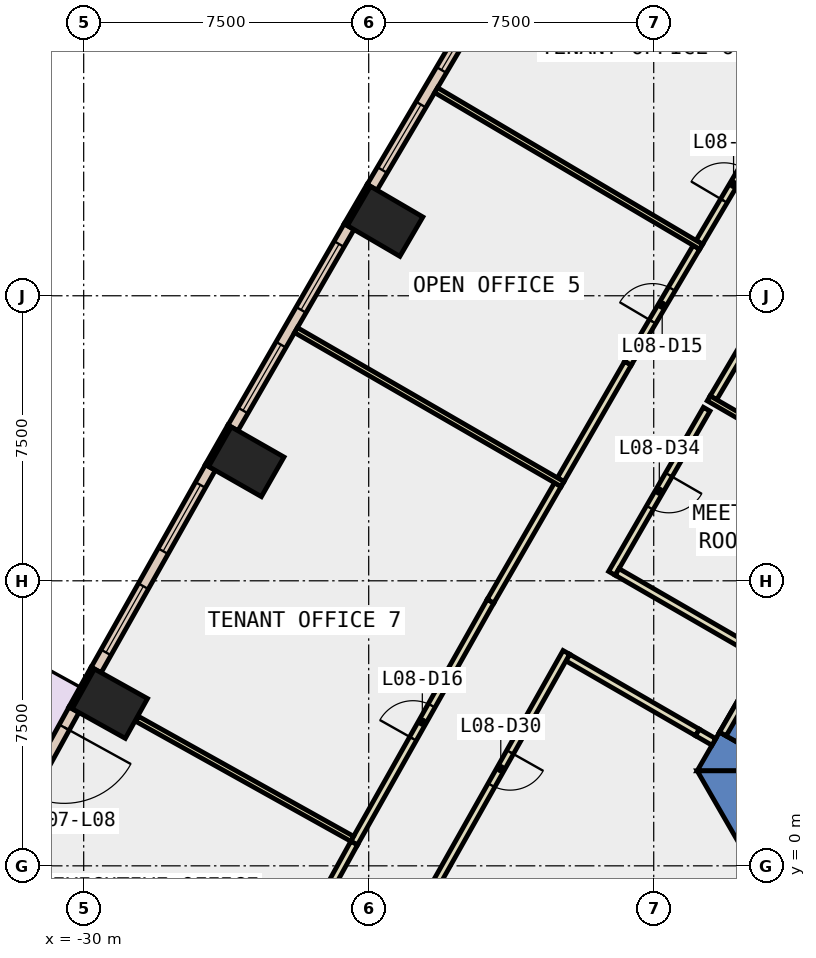
"""IFC4 building model, lengths in metres.
Left out: names, types, materials, properties, quantities, classifications, styles, units other than length and angle.
Written with IfcOpenShell. Run it as: python <this file> out.ifc"""

import sys

from ifc_helpers import new_model, si_unit, direction, frame, frame_2d, origin, origin_2d, place, context, subcontext, project, spatial, polyline, rectangle, outline, extrude, element, fill, save


model = new_model("IFC4")
c1 = context("Model", 3, precision=1e-05, world=origin(), true_north=direction((0.0, 1.0)))
c2 = subcontext(c1, "Body", "Model", "MODEL_VIEW")
j1 = project(units=[si_unit("LENGTHUNIT", "METRE"), si_unit("PLANEANGLEUNIT", "RADIAN")], contexts=[c1])
p1 = place(None, origin())
s1 = spatial("IfcSite", under=j1, at=p1, CompositionType="ELEMENT")
p2 = place(p1, origin())
s2 = spatial("IfcBuilding", under=s1, at=p2, CompositionType="ELEMENT")
p3 = place(p2, frame((0.0, 0.0, 43.4)))
s3 = spatial("IfcBuildingStorey", under=s2, at=p3, CompositionType="ELEMENT", Elevation=43.4)
for number, where, z_axis, x_axis in (
    (1, (-22.068, 16.959, -0.4), (0.0, 0.0, 1.0), (0.504, 0.864, 0.0)),
    (2, (-25.721, 10.632, -0.4), (0.0, 0.0, 1.0), (0.496, 0.869, 0.0)),
    (3, (-29.311, 4.267, -0.4), (0.0, 0.0, 1.0), (0.487, 0.873, 0.0)),
):
    element("IfcColumn", number, at=place(p3, frame(where, z_axis=z_axis, x_axis=x_axis)), inside=s3, PredefinedType="COLUMN", context=c2, shape_type="SweptSolid", body=[
        extrude(rectangle(XDim=1.2, YDim=1.6, at=origin_2d()), origin(), (0.0, 0.0, 1.0), 4.2),
    ])
p4 = place(p3, frame((0.0, 0.0, -0.4)))
e4 = element("IfcWall", 4, at=p4, inside=s3, PredefinedType="SHEAR", context=c2, shape_type="SweptSolid", body=[
    extrude(outline(polyline([(-12.402, 3.02), (-13.267, 3.52), (-13.856, 2.5), (-12.702, 2.5), (-12.402, 3.02)])), origin(), (0.0, 0.0, 1.0), 4.2),
])
p5 = place(p3, frame((0.0, 0.0, 3.6)))
e5 = element("IfcWall", 5, at=p5, inside=s3, PredefinedType="SHEAR", context=c2, shape_type="SweptSolid", body=[
    extrude(outline(polyline([(-13.267, 3.52), (-12.402, 3.02), (-11.402, 4.752), (-12.267, 5.252), (-13.267, 3.52)])), origin(), (0.0, 0.0, 1.0), 0.2),
])
p6 = place(p3, frame((0.0, 0.0, -0.4)))
e6 = element("IfcWall", 6, at=p6, inside=s3, PredefinedType="SHEAR", context=c2, shape_type="SweptSolid", body=[
    extrude(outline(polyline([(-13.856, 2.5), (-6.928, -9.5), (-6.351, -8.5), (-12.702, 2.5), (-13.856, 2.5)])), origin(), (0.0, 0.0, 1.0), 4.2),
])
p7 = place(p3, frame((-22.499, 17.906, 0.0), z_axis=(0.0, 0.0, 1.0), x_axis=(-0.504313844903, -0.863520437418, 0.0)))
e7 = element("IfcWall", 7, at=p7, inside=s3, PredefinedType="STANDARD", context=c2, shape_type="SweptSolid", body=[
    extrude(rectangle(XDim=1.2, YDim=0.1, at=frame_2d((0.6, 0.0))), origin(), (0.0, 0.0, 1.0), 3.8),
])
p8 = place(p3, frame((-26.162, 11.574, 0.0), z_axis=(0.0, 0.0, 1.0), x_axis=(-0.495854054996, -0.868405870629, 0.0)))
e8 = element("IfcWall", 8, at=p8, inside=s3, PredefinedType="STANDARD", context=c2, shape_type="SweptSolid", body=[
    extrude(rectangle(XDim=1.2, YDim=0.1, at=frame_2d((0.6, 0.0))), origin(), (0.0, 0.0, 1.0), 3.8),
])
p9 = place(p3, frame((-29.761, 5.205, 0.0), z_axis=(0.0, 0.0, 1.0), x_axis=(-0.486730996044, -0.87355190887, 0.0)))
e9 = element("IfcWall", 9, at=p9, inside=s3, PredefinedType="STANDARD", context=c2, shape_type="SweptSolid", body=[
    extrude(rectangle(XDim=1.2, YDim=0.1, at=frame_2d((0.6, 0.0))), origin(), (0.0, 0.0, 1.0), 3.8),
])
p10 = place(p3, frame((-19.299, 23.119, 0.0), z_axis=(0.0, 0.0, 1.0), x_axis=(-0.508749483145, -0.860914608658, 0.0)))
e10 = element("IfcWall", 10, at=p10, inside=s3, PredefinedType="STANDARD", context=c2, shape_type="SweptSolid", body=[
    extrude(rectangle(XDim=6.117, YDim=0.3, at=frame_2d((3.058, 0.0))), origin(), (0.0, 0.0, 1.0), 3.8),
])
p11 = place(p10, frame((0.529, 0.0, 0.9)))
e11 = element("IfcOpeningElement", 11, at=p11, cuts=e10, PredefinedType="OPENING", context=c2, shape_type="SweptSolid", body=[
    extrude(rectangle(XDim=2.0, YDim=2.6, at=frame_2d((1.0, 1.3))), frame((0.0, 0.16, 0.0), z_axis=(0.0, -1.0, 0.0), x_axis=(1.0, 0.0, 0.0)), (0.0, 0.0, 1.0), 0.32),
])
p12 = place(p10, frame((3.588, 0.0, 0.9)))
e12 = element("IfcOpeningElement", 12, at=p12, cuts=e10, PredefinedType="OPENING", context=c2, shape_type="SweptSolid", body=[
    extrude(rectangle(XDim=2.0, YDim=2.6, at=frame_2d((1.0, 1.3))), frame((0.0, 0.16, 0.0), z_axis=(0.0, -1.0, 0.0), x_axis=(1.0, 0.0, 0.0)), (0.0, 0.0, 1.0), 0.32),
])
p13 = place(p3, frame((-23.015, 16.819, 0.0), z_axis=(0.0, 0.0, 1.0), x_axis=(-0.499976985038, -0.866038691071, 0.0)))
e13 = element("IfcWall", 13, at=p13, inside=s3, PredefinedType="STANDARD", context=c2, shape_type="SweptSolid", body=[
    extrude(rectangle(XDim=6.116, YDim=0.3, at=frame_2d((3.058, 0.0))), origin(), (0.0, 0.0, 1.0), 3.8),
])
p14 = place(p13, frame((0.529, 0.0, 0.9)))
e14 = element("IfcOpeningElement", 14, at=p14, cuts=e13, PredefinedType="OPENING", context=c2, shape_type="SweptSolid", body=[
    extrude(rectangle(XDim=2.0, YDim=2.6, at=frame_2d((1.0, 1.3))), frame((0.0, 0.16, 0.0), z_axis=(0.0, -1.0, 0.0), x_axis=(1.0, 0.0, 0.0)), (0.0, 0.0, 1.0), 0.32),
])
p15 = place(p13, frame((3.587, 0.0, 0.9)))
e15 = element("IfcOpeningElement", 15, at=p15, cuts=e13, PredefinedType="OPENING", context=c2, shape_type="SweptSolid", body=[
    extrude(rectangle(XDim=2.0, YDim=2.6, at=frame_2d((1.0, 1.3))), frame((0.0, 0.16, 0.0), z_axis=(0.0, -1.0, 0.0), x_axis=(1.0, 0.0, 0.0)), (0.0, 0.0, 1.0), 0.32),
])
p16 = place(p3, frame((-26.667, 10.482, 0.0), z_axis=(0.0, 0.0, 1.0), x_axis=(-0.491278487323, -0.871002553322, 0.0)))
e16 = element("IfcWall", 16, at=p16, inside=s3, PredefinedType="STANDARD", context=c2, shape_type="SweptSolid", body=[
    extrude(rectangle(XDim=6.117, YDim=0.3, at=frame_2d((3.059, 0.0))), origin(), (0.0, 0.0, 1.0), 3.8),
])
p17 = place(p16, frame((0.529, 0.0, 0.9)))
e17 = element("IfcOpeningElement", 17, at=p17, cuts=e16, PredefinedType="OPENING", context=c2, shape_type="SweptSolid", body=[
    extrude(rectangle(XDim=2.0, YDim=2.6, at=frame_2d((1.0, 1.3))), frame((0.0, 0.16, 0.0), z_axis=(0.0, -1.0, 0.0), x_axis=(1.0, 0.0, 0.0)), (0.0, 0.0, 1.0), 0.32),
])
p18 = place(p16, frame((3.588, 0.0, 0.9)))
e18 = element("IfcOpeningElement", 18, at=p18, cuts=e16, PredefinedType="OPENING", context=c2, shape_type="SweptSolid", body=[
    extrude(rectangle(XDim=2.0, YDim=2.6, at=frame_2d((1.0, 1.3))), frame((0.0, 0.16, 0.0), z_axis=(0.0, -1.0, 0.0), x_axis=(1.0, 0.0, 0.0)), (0.0, 0.0, 1.0), 0.32),
])
p19 = place(p3, frame((-30.255, 4.107, 0.0), z_axis=(0.0, 0.0, 1.0), x_axis=(-0.482596003603, -0.875843078015, 0.0)))
e19 = element("IfcWall", 19, at=p19, inside=s3, PredefinedType="STANDARD", context=c2, shape_type="SweptSolid", body=[
    extrude(rectangle(XDim=6.115, YDim=0.3, at=frame_2d((3.058, 0.0))), origin(), (0.0, 0.0, 1.0), 3.8),
])
p20 = place(p19, frame((0.529, 0.0, 0.0)))
e20 = element("IfcOpeningElement", 20, at=p20, cuts=e19, PredefinedType="OPENING", context=c2, shape_type="SweptSolid", body=[
    extrude(rectangle(XDim=2.0, YDim=2.4, at=frame_2d((1.0, 1.2))), frame((0.0, 0.16, 0.0), z_axis=(0.0, -1.0, 0.0), x_axis=(1.0, 0.0, 0.0)), (0.0, 0.0, 1.0), 0.32),
])
p21 = place(p19, frame((3.586, 0.0, 0.9)))
e21 = element("IfcOpeningElement", 21, at=p21, cuts=e19, PredefinedType="OPENING", context=c2, shape_type="SweptSolid", body=[
    extrude(rectangle(XDim=2.0, YDim=2.6, at=frame_2d((1.0, 1.3))), frame((0.0, 0.16, 0.0), z_axis=(0.0, -1.0, 0.0), x_axis=(1.0, 0.0, 0.0)), (0.0, 0.0, 1.0), 0.32),
])
p22 = place(p3, frame((-13.606, 12.016, 0.0), z_axis=(0.0, 0.0, 1.0), x_axis=(-0.499992180995, -0.866029918042, 0.0)))
e22 = element("IfcWall", 22, at=p22, inside=s3, PredefinedType="PARTITIONING", context=c2, shape_type="SweptSolid", body=[
    extrude(rectangle(XDim=4.988, YDim=0.2, at=frame_2d((2.494, 0.0))), origin(), (0.0, 0.0, 1.0), 3.8),
])
p23 = place(p22, frame((1.994, 0.0, 0.0)))
e23 = element("IfcOpeningElement", 23, at=p23, cuts=e22, PredefinedType="OPENING", context=c2, shape_type="SweptSolid", body=[
    extrude(rectangle(XDim=1.0, YDim=2.1, at=frame_2d((0.5, 1.05))), frame((0.0, 0.11, 0.0), z_axis=(0.0, -1.0, 0.0), x_axis=(1.0, 0.0, 0.0)), (0.0, 0.0, 1.0), 0.22),
])
p24 = place(p3, frame((-15.963, 7.733, 0.0), z_axis=(0.0, 0.0, 1.0), x_axis=(0.865965832374, -0.500103166518, 0.0)))
e24 = element("IfcWall", 24, at=p24, inside=s3, PredefinedType="PARTITIONING", context=c2, shape_type="SweptSolid", body=[
    extrude(rectangle(XDim=3.941, YDim=0.2, at=frame_2d((1.971, 0.0))), origin(), (0.0, 0.0, 1.0), 3.8),
])
p25 = place(p3, frame((-12.218, 14.364, 0.0), z_axis=(0.0, 0.0, 1.0), x_axis=(-0.508767325294, -0.860904064756, 0.0)))
e25 = element("IfcWall", 25, at=p25, inside=s3, PredefinedType="PARTITIONING", context=c2, shape_type="SweptSolid", body=[
    extrude(rectangle(XDim=2.38, YDim=0.2, at=frame_2d((1.19, 0.0))), origin(), (0.0, 0.0, 1.0), 3.8),
])
p26 = place(p3, frame((-17.261, 5.48, 0.0), z_axis=(0.0, 0.0, 1.0), x_axis=(0.865949187497, -0.500131987253, 0.0)))
e26 = element("IfcWall", 26, at=p26, inside=s3, PredefinedType="PARTITIONING", context=c2, shape_type="SweptSolid", body=[
    extrude(rectangle(XDim=3.939, YDim=0.2, at=frame_2d((1.969, 0.0))), origin(), (0.0, 0.0, 1.0), 3.8),
])
p27 = place(p3, frame((-17.299, 5.617, 0.0), z_axis=(0.0, 0.0, 1.0), x_axis=(-0.491166441632, -0.871065741844, 0.0)))
e27 = element("IfcWall", 27, at=p27, inside=s3, PredefinedType="PARTITIONING", context=c2, shape_type="SweptSolid", body=[
    extrude(rectangle(XDim=7.028, YDim=0.2, at=frame_2d((3.514, 0.0))), origin(), (0.0, 0.0, 1.0), 3.8),
])
p28 = place(p27, frame((3.014, 0.0, 0.0)))
e28 = element("IfcOpeningElement", 28, at=p28, cuts=e27, PredefinedType="OPENING", context=c2, shape_type="SweptSolid", body=[
    extrude(rectangle(XDim=1.0, YDim=2.1, at=frame_2d((0.5, 1.05))), frame((0.0, 0.11, 0.0), z_axis=(0.0, -1.0, 0.0), x_axis=(1.0, 0.0, 0.0)), (0.0, 0.0, 1.0), 0.22),
])
p29 = place(p3, frame((-13.8, 16.404, 0.0), z_axis=(0.0, 0.0, 1.0), x_axis=(0.508666621784, 0.860963569428, 0.0)))
e29 = element("IfcWall", 29, at=p29, inside=s3, PredefinedType="PARTITIONING", context=c2, shape_type="SweptSolid", body=[
    extrude(rectangle(XDim=3.542, YDim=0.2, at=frame_2d((1.771, 0.0))), origin(), (0.0, 0.0, 1.0), 3.8),
])
p30 = place(p29, frame((1.271, 0.0, 0.0)))
e30 = element("IfcOpeningElement", 30, at=p30, cuts=e29, PredefinedType="OPENING", context=c2, shape_type="SweptSolid", body=[
    extrude(rectangle(XDim=1.0, YDim=2.1, at=frame_2d((0.5, 1.05))), frame((0.0, 0.11, 0.0), z_axis=(0.0, -1.0, 0.0), x_axis=(1.0, 0.0, 0.0)), (0.0, 0.0, 1.0), 0.22),
])
p31 = place(p3, frame((-17.448, 10.16, 0.0), z_axis=(0.0, 0.0, 1.0), x_axis=(0.499951278228, 0.866053531485, 0.0)))
e31 = element("IfcWall", 31, at=p31, inside=s3, PredefinedType="PARTITIONING", context=c2, shape_type="SweptSolid", body=[
    extrude(rectangle(XDim=3.54, YDim=0.2, at=frame_2d((1.77, 0.0))), origin(), (0.0, 0.0, 1.0), 3.8),
])
p32 = place(p3, frame((-15.678, 13.226, 0.0), z_axis=(0.0, 0.0, 1.0), x_axis=(0.508613166028, 0.860995149431, 0.0)))
e32 = element("IfcWall", 32, at=p32, inside=s3, PredefinedType="PARTITIONING", context=c2, shape_type="SweptSolid", body=[
    extrude(rectangle(XDim=3.541, YDim=0.2, at=frame_2d((1.771, 0.0))), origin(), (0.0, 0.0, 1.0), 3.8),
])
p33 = place(p32, frame((1.271, 0.0, 0.0)))
e33 = element("IfcOpeningElement", 33, at=p33, cuts=e32, PredefinedType="OPENING", context=c2, shape_type="SweptSolid", body=[
    extrude(rectangle(XDim=1.0, YDim=2.1, at=frame_2d((0.5, 1.05))), frame((0.0, 0.11, 0.0), z_axis=(0.0, -1.0, 0.0), x_axis=(1.0, 0.0, 0.0)), (0.0, 0.0, 1.0), 0.22),
])
p34 = place(p3, frame((-22.884, 0.598, 0.0), z_axis=(0.0, 0.0, 1.0), x_axis=(0.491206176175, 0.871043335597, 0.0)))
e34 = element("IfcWall", 34, at=p34, inside=s3, PredefinedType="PARTITIONING", context=c2, shape_type="SweptSolid", body=[
    extrude(rectangle(XDim=7.309, YDim=0.2, at=frame_2d((3.654, 0.0))), origin(), (0.0, 0.0, 1.0), 3.8),
])
p35 = place(p34, frame((3.154, 0.0, 0.0)))
e35 = element("IfcOpeningElement", 35, at=p35, cuts=e34, PredefinedType="OPENING", context=c2, shape_type="SweptSolid", body=[
    extrude(rectangle(XDim=1.0, YDim=2.1, at=frame_2d((0.5, 1.05))), frame((0.0, 0.11, 0.0), z_axis=(0.0, -1.0, 0.0), x_axis=(1.0, 0.0, 0.0)), (0.0, 0.0, 1.0), 0.22),
])
p36 = place(p3, frame((-19.294, 6.964, 0.0), z_axis=(0.0, 0.0, 1.0), x_axis=(0.499861717316, 0.86610522661, 0.0)))
e36 = element("IfcWall", 36, at=p36, inside=s3, PredefinedType="PARTITIONING", context=c2, shape_type="SweptSolid", body=[
    extrude(rectangle(XDim=3.541, YDim=0.2, at=frame_2d((1.771, 0.0))), origin(), (0.0, 0.0, 1.0), 3.8),
])
p37 = place(p3, frame((-26.373, -5.736, 0.0), z_axis=(0.0, 0.0, 1.0), x_axis=(0.482587313112, 0.875847866483, 0.0)))
e37 = element("IfcWall", 37, at=p37, inside=s3, PredefinedType="PARTITIONING", context=c2, shape_type="SweptSolid", body=[
    extrude(rectangle(XDim=7.232, YDim=0.2, at=frame_2d((3.616, 0.0))), origin(), (0.0, 0.0, 1.0), 3.8),
])
p38 = place(p37, frame((3.191, 0.0, 0.0)))
e38 = element("IfcOpeningElement", 38, at=p38, cuts=e37, PredefinedType="OPENING", context=c2, shape_type="SweptSolid", body=[
    extrude(rectangle(XDim=1.0, YDim=2.1, at=frame_2d((0.5, 1.05))), frame((0.0, 0.11, 0.0), z_axis=(0.0, -1.0, 0.0), x_axis=(1.0, 0.0, 0.0)), (0.0, 0.0, 1.0), 0.22),
])
p39 = place(p3, frame((-13.554, 12.3, 0.0), z_axis=(0.0, 0.0, 1.0), x_axis=(0.866028685375, -0.499994316075, 0.0)))
e39 = element("IfcWall", 39, at=p39, inside=s3, PredefinedType="PARTITIONING", context=c2, shape_type="SweptSolid", body=[
    extrude(rectangle(XDim=4.638, YDim=0.15, at=frame_2d((2.319, 0.0))), origin(), (0.0, 0.0, 1.0), 3.8),
])
p40 = place(p3, frame((-13.752, 16.289, 0.0), z_axis=(0.0, 0.0, 1.0), x_axis=(-0.86093852802, 0.508709004216, 0.0)))
e40 = element("IfcWall", 40, at=p40, inside=s3, PredefinedType="PARTITIONING", context=c2, shape_type="SweptSolid", body=[
    extrude(rectangle(XDim=8.101, YDim=0.15, at=frame_2d((4.05, 0.0))), origin(), (0.0, 0.0, 1.0), 3.8),
])
p41 = place(p3, frame((-17.399, 10.045, 0.0), z_axis=(0.0, 0.0, 1.0), x_axis=(-0.865980803489, 0.500077242023, 0.0)))
e41 = element("IfcWall", 41, at=p41, inside=s3, PredefinedType="PARTITIONING", context=c2, shape_type="SweptSolid", body=[
    extrude(rectangle(XDim=8.101, YDim=0.15, at=frame_2d((4.05, 0.0))), origin(), (0.0, 0.0, 1.0), 3.8),
])
p42 = place(p3, frame((-22.935, 0.712, 0.0), z_axis=(0.0, 0.0, 1.0), x_axis=(-0.873395616379, 0.487011393389, 0.0)))
e42 = element("IfcWall", 42, at=p42, inside=s3, PredefinedType="PARTITIONING", context=c2, shape_type="SweptSolid", body=[
    extrude(rectangle(XDim=6.48, YDim=0.15, at=frame_2d((3.24, 0.0))), origin(), (0.0, 0.0, 1.0), 3.8),
])
p43 = place(p3, frame((-12.18, 5.202, 0.0), z_axis=(0.0, 0.0, 1.0), x_axis=(-0.50002537861, -0.866010750942, 0.0)))
e43 = element("IfcWall", 43, at=p43, inside=s3, PredefinedType="PARTITIONING", context=c2, shape_type="SweptSolid", body=[
    extrude(rectangle(XDim=2.0, YDim=0.2, at=frame_2d((1.0, 0.0))), origin(), (0.0, 0.0, 1.0), 2.4),
])
p44 = place(p43, frame((0.19, 0.0, 0.0)))
e44 = element("IfcOpeningElement", 44, at=p44, cuts=e43, PredefinedType="OPENING", context=c2, shape_type="SweptSolid", body=[
    extrude(rectangle(XDim=1.8, YDim=2.1, at=frame_2d((0.9, 1.05))), frame((0.0, 0.11, 0.0), z_axis=(0.0, -1.0, 0.0), x_axis=(1.0, 0.0, 0.0)), (0.0, 0.0, 1.0), 0.22),
])
p45 = place(p3, frame((-13.85, 3.51, 0.0), z_axis=(0.0, 0.0, 1.0), x_axis=(0.866071776036, -0.499919672301, 0.0)))
e45 = element("IfcWall", 45, at=p45, inside=s3, PredefinedType="PARTITIONING", context=c2, shape_type="SweptSolid", body=[
    extrude(rectangle(XDim=0.5, YDim=0.2, at=frame_2d((0.25, 0.0))), origin(), (0.0, 0.0, 1.0), 2.4),
])
p46 = place(p11, origin())
e46 = element("IfcWindow", 46, at=p46, inside=s3, PartitioningType="SINGLE_PANEL", PredefinedType="WINDOW", context=c2, shape_type="SweptSolid", body=[
    extrude(rectangle(XDim=2.0, YDim=2.6, at=frame_2d((1.0, 1.3))), frame((0.0, 0.03, 0.0), z_axis=(0.0, -1.0, 0.0), x_axis=(1.0, 0.0, 0.0)), (0.0, 0.0, 1.0), 0.06),
])
fill(e11, e46)
p47 = place(p12, origin())
e47 = element("IfcWindow", 47, at=p47, inside=s3, PartitioningType="SINGLE_PANEL", PredefinedType="WINDOW", context=c2, shape_type="SweptSolid", body=[
    extrude(rectangle(XDim=2.0, YDim=2.6, at=frame_2d((1.0, 1.3))), frame((0.0, 0.03, 0.0), z_axis=(0.0, -1.0, 0.0), x_axis=(1.0, 0.0, 0.0)), (0.0, 0.0, 1.0), 0.06),
])
fill(e12, e47)
p48 = place(p14, origin())
e48 = element("IfcWindow", 48, at=p48, inside=s3, PartitioningType="SINGLE_PANEL", PredefinedType="WINDOW", context=c2, shape_type="SweptSolid", body=[
    extrude(rectangle(XDim=2.0, YDim=2.6, at=frame_2d((1.0, 1.3))), frame((0.0, 0.03, 0.0), z_axis=(0.0, -1.0, 0.0), x_axis=(1.0, 0.0, 0.0)), (0.0, 0.0, 1.0), 0.06),
])
fill(e14, e48)
p49 = place(p15, origin())
e49 = element("IfcWindow", 49, at=p49, inside=s3, PartitioningType="SINGLE_PANEL", PredefinedType="WINDOW", context=c2, shape_type="SweptSolid", body=[
    extrude(rectangle(XDim=2.0, YDim=2.6, at=frame_2d((1.0, 1.3))), frame((0.0, 0.03, 0.0), z_axis=(0.0, -1.0, 0.0), x_axis=(1.0, 0.0, 0.0)), (0.0, 0.0, 1.0), 0.06),
])
fill(e15, e49)
p50 = place(p17, origin())
e50 = element("IfcWindow", 50, at=p50, inside=s3, PartitioningType="SINGLE_PANEL", PredefinedType="WINDOW", context=c2, shape_type="SweptSolid", body=[
    extrude(rectangle(XDim=2.0, YDim=2.6, at=frame_2d((1.0, 1.3))), frame((0.0, 0.03, 0.0), z_axis=(0.0, -1.0, 0.0), x_axis=(1.0, 0.0, 0.0)), (0.0, 0.0, 1.0), 0.06),
])
fill(e17, e50)
p51 = place(p18, origin())
e51 = element("IfcWindow", 51, at=p51, inside=s3, PartitioningType="SINGLE_PANEL", PredefinedType="WINDOW", context=c2, shape_type="SweptSolid", body=[
    extrude(rectangle(XDim=2.0, YDim=2.6, at=frame_2d((1.0, 1.3))), frame((0.0, 0.03, 0.0), z_axis=(0.0, -1.0, 0.0), x_axis=(1.0, 0.0, 0.0)), (0.0, 0.0, 1.0), 0.06),
])
fill(e18, e51)
p52 = place(p20, origin())
e52 = element("IfcDoor", 52, at=p52, inside=s3, OperationType="SLIDING_TO_LEFT", PredefinedType="DOOR", context=c2, shape_type="SweptSolid", body=[
    extrude(rectangle(XDim=2.0, YDim=2.4, at=frame_2d((1.0, 1.2))), frame((0.0, 0.025, 0.0), z_axis=(0.0, -1.0, 0.0), x_axis=(1.0, 0.0, 0.0)), (0.0, 0.0, 1.0), 0.05),
])
fill(e20, e52)
p53 = place(p30, origin())
e53 = element("IfcDoor", 53, at=p53, inside=s3, OperationType="SINGLE_SWING_LEFT", PredefinedType="DOOR", context=c2, shape_type="SweptSolid", body=[
    extrude(rectangle(XDim=1.0, YDim=2.1, at=frame_2d((0.5, 1.05))), frame((0.0, 0.025, 0.0), z_axis=(0.0, -1.0, 0.0), x_axis=(1.0, 0.0, 0.0)), (0.0, 0.0, 1.0), 0.05),
])
fill(e30, e53)
p54 = place(p33, origin())
e54 = element("IfcDoor", 54, at=p54, inside=s3, OperationType="SINGLE_SWING_LEFT", PredefinedType="DOOR", context=c2, shape_type="SweptSolid", body=[
    extrude(rectangle(XDim=1.0, YDim=2.1, at=frame_2d((0.5, 1.05))), frame((0.0, 0.025, 0.0), z_axis=(0.0, -1.0, 0.0), x_axis=(1.0, 0.0, 0.0)), (0.0, 0.0, 1.0), 0.05),
])
fill(e33, e54)
p55 = place(p35, origin())
e55 = element("IfcDoor", 55, at=p55, inside=s3, OperationType="SINGLE_SWING_RIGHT", PredefinedType="DOOR", context=c2, shape_type="SweptSolid", body=[
    extrude(rectangle(XDim=1.0, YDim=2.1, at=frame_2d((0.5, 1.05))), frame((0.0, 0.025, 0.0), z_axis=(0.0, -1.0, 0.0), x_axis=(1.0, 0.0, 0.0)), (0.0, 0.0, 1.0), 0.05),
])
fill(e35, e55)
p56 = place(p28, origin())
e56 = element("IfcDoor", 56, at=p56, inside=s3, OperationType="SINGLE_SWING_RIGHT", PredefinedType="DOOR", context=c2, shape_type="SweptSolid", body=[
    extrude(rectangle(XDim=1.0, YDim=2.1, at=frame_2d((0.5, 1.05))), frame((0.0, 0.025, 0.0), z_axis=(0.0, -1.0, 0.0), x_axis=(1.0, 0.0, 0.0)), (0.0, 0.0, 1.0), 0.05),
])
fill(e28, e56)
p57 = place(p23, origin())
e57 = element("IfcDoor", 57, at=p57, inside=s3, OperationType="SINGLE_SWING_LEFT", PredefinedType="DOOR", context=c2, shape_type="SweptSolid", body=[
    extrude(rectangle(XDim=1.0, YDim=2.1, at=frame_2d((0.5, 1.05))), frame((0.0, 0.025, 0.0), z_axis=(0.0, -1.0, 0.0), x_axis=(1.0, 0.0, 0.0)), (0.0, 0.0, 1.0), 0.05),
])
fill(e23, e57)
p58 = place(p44, origin())
e58 = element("IfcDoor", 58, at=p58, inside=s3, OperationType="DOUBLE_DOOR_SINGLE_SWING", PredefinedType="DOOR", context=c2, shape_type="SweptSolid", body=[
    extrude(rectangle(XDim=1.8, YDim=2.1, at=frame_2d((0.9, 1.05))), frame((0.0, 0.025, 0.0), z_axis=(0.0, -1.0, 0.0), x_axis=(1.0, 0.0, 0.0)), (0.0, 0.0, 1.0), 0.05),
])
fill(e44, e58)
save(model, sys.argv[1])
